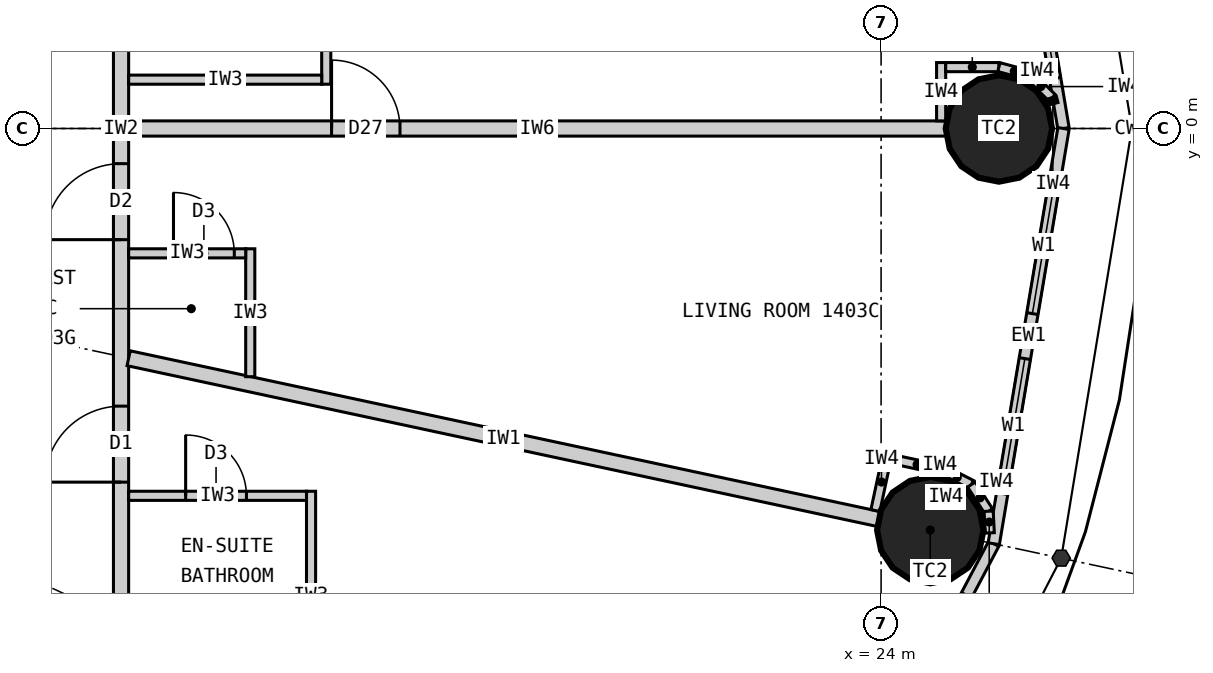
"""IFC4 building model, lengths in metres.
Left out: names, types, materials, properties, quantities, classifications, styles, units other than length and angle.
Written with IfcOpenShell. Run it as: python <this file> out.ifc"""

import sys

from ifc_helpers import new_model, si_unit, direction, frame, frame_2d, origin, origin_2d, place, context, subcontext, project, spatial, rectangle, circle, extrude, element, fill, save


model = new_model("IFC4")
c1 = context("Model", 3, precision=1e-05, world=origin(), true_north=direction((0.0, 1.0)))
c2 = subcontext(c1, "Body", "Model", "MODEL_VIEW")
j1 = project(units=[si_unit("LENGTHUNIT", "METRE"), si_unit("PLANEANGLEUNIT", "RADIAN")], contexts=[c1])
p1 = place(None, origin())
s1 = spatial("IfcSite", under=j1, at=p1, CompositionType="ELEMENT")
p2 = place(p1, origin())
s2 = spatial("IfcBuilding", under=s1, at=p2, CompositionType="ELEMENT")
p3 = place(p2, frame((0.0, 0.0, 60.6)))
s3 = spatial("IfcBuildingStorey", under=s2, at=p3, CompositionType="ELEMENT", Elevation=60.6)
for number, where, z_axis, x_axis in (
    (1, (25.55, 0.0, 0.0), (0.0, 0.0, 1.0), (1.0, 0.0, 0.0)),
    (2, (24.647, -5.283, 0.0), (0.0, 0.0, 1.0), (1.0, 0.0, 0.0)),
):
    element("IfcColumn", number, at=place(p3, frame(where, z_axis=z_axis, x_axis=x_axis)), inside=s3, PredefinedType="COLUMN", context=c2, shape_type="SweptSolid", body=[
        extrude(circle(Radius=0.7, at=origin_2d()), origin(), (0.0, 0.0, 1.0), 3.3),
    ])
p4 = place(p3, frame((26.4, 0.0, 0.0), z_axis=(0.0, 0.0, 1.0), x_axis=(-0.165642551694, 0.986185857264, 0.0)))
e3 = element("IfcWall", 3, at=p4, inside=s3, PredefinedType="ELEMENTEDWALL", context=c2, shape_type="SweptSolid", body=[
    extrude(rectangle(XDim=5.539, YDim=0.15, at=frame_2d((2.77, 0.0))), origin(), (0.0, 0.0, 1.0), 3.12),
])
p5 = place(p4, frame((0.669, 0.0, 0.9)))
e4 = element("IfcOpeningElement", 4, at=p5, cuts=e3, PredefinedType="OPENING", context=c2, shape_type="SweptSolid", body=[
    extrude(rectangle(XDim=1.8, YDim=1.9, at=frame_2d((0.9, 0.95))), frame((0.0, 0.085, 0.0), z_axis=(0.0, -1.0, 0.0), x_axis=(1.0, 0.0, 0.0)), (0.0, 0.0, 1.0), 0.17),
])
p6 = place(p4, frame((3.07, 0.0, 0.9)))
e5 = element("IfcOpeningElement", 5, at=p6, cuts=e3, PredefinedType="OPENING", context=c2, shape_type="SweptSolid", body=[
    extrude(rectangle(XDim=1.8, YDim=1.9, at=frame_2d((0.9, 0.95))), frame((0.0, 0.085, 0.0), z_axis=(0.0, -1.0, 0.0), x_axis=(1.0, 0.0, 0.0)), (0.0, 0.0, 1.0), 0.17),
])
p7 = place(p3, frame((22.803, -10.532, 0.0), z_axis=(0.0, 0.0, 1.0), x_axis=(0.467296867008, 0.884100468321, 0.0)))
e6 = element("IfcWall", 6, at=p7, inside=s3, PredefinedType="ELEMENTEDWALL", context=c2, shape_type="SweptSolid", body=[
    extrude(rectangle(XDim=5.734, YDim=0.15, at=frame_2d((2.867, 0.0))), origin(), (0.0, 0.0, 1.0), 3.12),
])
p8 = place(p7, frame((0.767, 0.0, 0.9)))
e7 = element("IfcOpeningElement", 7, at=p8, cuts=e6, PredefinedType="OPENING", context=c2, shape_type="SweptSolid", body=[
    extrude(rectangle(XDim=1.8, YDim=1.9, at=frame_2d((0.9, 0.95))), frame((0.0, 0.085, 0.0), z_axis=(0.0, -1.0, 0.0), x_axis=(1.0, 0.0, 0.0)), (0.0, 0.0, 1.0), 0.17),
])
p9 = place(p7, frame((3.167, 0.0, 0.9)))
e8 = element("IfcOpeningElement", 8, at=p9, cuts=e6, PredefinedType="OPENING", context=c2, shape_type="SweptSolid", body=[
    extrude(rectangle(XDim=1.8, YDim=1.9, at=frame_2d((0.9, 0.95))), frame((0.0, 0.085, 0.0), z_axis=(0.0, -1.0, 0.0), x_axis=(1.0, 0.0, 0.0)), (0.0, 0.0, 1.0), 0.17),
])
p10 = place(p3, frame((25.482, -5.462, 0.0), z_axis=(0.0, 0.0, 1.0), x_axis=(0.165642551694, 0.986185857264, 0.0)))
e9 = element("IfcWall", 9, at=p10, inside=s3, PredefinedType="ELEMENTEDWALL", context=c2, shape_type="SweptSolid", body=[
    extrude(rectangle(XDim=5.539, YDim=0.15, at=frame_2d((2.77, 0.0))), origin(), (0.0, 0.0, 1.0), 3.12),
])
p11 = place(p10, frame((0.669, 0.0, 0.9)))
e10 = element("IfcOpeningElement", 10, at=p11, cuts=e9, PredefinedType="OPENING", context=c2, shape_type="SweptSolid", body=[
    extrude(rectangle(XDim=1.8, YDim=1.9, at=frame_2d((0.9, 0.95))), frame((0.0, 0.085, 0.0), z_axis=(0.0, -1.0, 0.0), x_axis=(1.0, 0.0, 0.0)), (0.0, 0.0, 1.0), 0.17),
])
p12 = place(p10, frame((3.07, 0.0, 0.9)))
e11 = element("IfcOpeningElement", 11, at=p12, cuts=e9, PredefinedType="OPENING", context=c2, shape_type="SweptSolid", body=[
    extrude(rectangle(XDim=1.8, YDim=1.9, at=frame_2d((0.9, 0.95))), frame((0.0, 0.085, 0.0), z_axis=(0.0, -1.0, 0.0), x_axis=(1.0, 0.0, 0.0)), (0.0, 0.0, 1.0), 0.17),
])
p13 = place(p3, frame((14.0, -9.9, 0.0), z_axis=(0.0, 0.0, 1.0), x_axis=(0.0, 1.0, 0.0)))
e12 = element("IfcWall", 12, at=p13, inside=s3, PredefinedType="PARTITIONING", context=c2, shape_type="SweptSolid", body=[
    extrude(rectangle(XDim=19.8, YDim=0.2, at=frame_2d((9.9, 0.0))), origin(), (0.0, 0.0, 1.0), 3.12),
])
p14 = place(p13, frame((0.103, 0.0, 0.0)))
e13 = element("IfcOpeningElement", 13, at=p14, cuts=e12, PredefinedType="OPENING", context=c2, shape_type="SweptSolid", body=[
    extrude(rectangle(XDim=1.0, YDim=2.2, at=frame_2d((0.5, 1.1))), frame((0.0, 0.11, 0.0), z_axis=(0.0, -1.0, 0.0), x_axis=(1.0, 0.0, 0.0)), (0.0, 0.0, 1.0), 0.22),
])
p15 = place(p13, frame((5.248, 0.0, 0.0)))
e14 = element("IfcOpeningElement", 14, at=p15, cuts=e12, PredefinedType="OPENING", context=c2, shape_type="SweptSolid", body=[
    extrude(rectangle(XDim=1.0, YDim=2.2, at=frame_2d((0.5, 1.1))), frame((0.0, 0.11, 0.0), z_axis=(0.0, -1.0, 0.0), x_axis=(1.0, 0.0, 0.0)), (0.0, 0.0, 1.0), 0.22),
])
p16 = place(p13, frame((8.438, 0.0, 0.0)))
e15 = element("IfcOpeningElement", 15, at=p16, cuts=e12, PredefinedType="OPENING", context=c2, shape_type="SweptSolid", body=[
    extrude(rectangle(XDim=1.0, YDim=2.2, at=frame_2d((0.5, 1.1))), frame((0.0, 0.11, 0.0), z_axis=(0.0, -1.0, 0.0), x_axis=(1.0, 0.0, 0.0)), (0.0, 0.0, 1.0), 0.22),
])
p17 = place(p13, frame((14.532, 0.0, 0.0)))
e16 = element("IfcOpeningElement", 16, at=p17, cuts=e12, PredefinedType="OPENING", context=c2, shape_type="SweptSolid", body=[
    extrude(rectangle(XDim=1.0, YDim=2.2, at=frame_2d((0.5, 1.1))), frame((0.0, 0.11, 0.0), z_axis=(0.0, -1.0, 0.0), x_axis=(1.0, 0.0, 0.0)), (0.0, 0.0, 1.0), 0.22),
])
p18 = place(p3, frame((14.1, 0.0, 0.0), z_axis=(0.0, 0.0, 1.0), x_axis=(1.0, 0.0, 0.0)))
e17 = element("IfcWall", 17, at=p18, inside=s3, PredefinedType="PARTITIONING", context=c2, shape_type="SweptSolid", body=[
    extrude(rectangle(XDim=10.75, YDim=0.2, at=frame_2d((5.375, 0.0))), origin(), (0.0, 0.0, 1.0), 2.27),
])
p19 = place(p18, frame((2.67, 0.0, 0.0)))
e18 = element("IfcOpeningElement", 18, at=p19, cuts=e17, PredefinedType="OPENING", context=c2, shape_type="SweptSolid", body=[
    extrude(rectangle(XDim=0.9, YDim=2.1, at=frame_2d((0.45, 1.05))), frame((0.0, 0.11, 0.0), z_axis=(0.0, -1.0, 0.0), x_axis=(1.0, 0.0, 0.0)), (0.0, 0.0, 1.0), 0.22),
])
p20 = place(p3, frame((14.1, -3.022, 0.0), z_axis=(0.0, 0.0, 1.0), x_axis=(0.977790014929, -0.209586943072, 0.0)))
e19 = element("IfcWall", 19, at=p20, inside=s3, PredefinedType="PARTITIONING", context=c2, shape_type="SweptSolid", body=[
    extrude(rectangle(XDim=10.087, YDim=0.2, at=frame_2d((5.043, 0.0))), origin(), (0.0, 0.0, 1.0), 2.32),
])
p21 = place(p3, frame((16.5, -7.521, 0.0), z_axis=(0.0, 0.0, 1.0), x_axis=(0.0, 1.0, 0.0)))
e20 = element("IfcWall", 20, at=p21, inside=s3, PredefinedType="PARTITIONING", context=c2, shape_type="SweptSolid", body=[
    extrude(rectangle(XDim=2.749, YDim=0.12, at=frame_2d((1.374, 0.0))), origin(), (0.0, 0.0, 1.0), 3.12),
])
p22 = place(p3, frame((14.1, -4.833, 0.0), z_axis=(0.0, 0.0, 1.0), x_axis=(1.0, 0.0, 0.0)))
e21 = element("IfcWall", 21, at=p22, inside=s3, PredefinedType="PARTITIONING", context=c2, shape_type="SweptSolid", body=[
    extrude(rectangle(XDim=2.34, YDim=0.12, at=frame_2d((1.17, 0.0))), origin(), (0.0, 0.0, 1.0), 3.12),
])
p23 = place(p22, frame((0.75, 0.0, 0.0)))
e22 = element("IfcOpeningElement", 22, at=p23, cuts=e21, PredefinedType="OPENING", context=c2, shape_type="SweptSolid", body=[
    extrude(rectangle(XDim=0.8, YDim=2.1, at=frame_2d((0.4, 1.05))), frame((0.0, 0.07, 0.0), z_axis=(0.0, -1.0, 0.0), x_axis=(1.0, 0.0, 0.0)), (0.0, 0.0, 1.0), 0.14),
])
p24 = place(p3, frame((15.7, -3.265, 0.0), z_axis=(0.0, 0.0, 1.0), x_axis=(0.0, 1.0, 0.0)))
e23 = element("IfcWall", 23, at=p24, inside=s3, PredefinedType="PARTITIONING", context=c2, shape_type="SweptSolid", body=[
    extrude(rectangle(XDim=1.683, YDim=0.12, at=frame_2d((0.841, 0.0))), origin(), (0.0, 0.0, 1.0), 3.12),
])
p25 = place(p3, frame((14.1, -1.643, 0.0), z_axis=(0.0, 0.0, 1.0), x_axis=(1.0, 0.0, 0.0)))
e24 = element("IfcWall", 24, at=p25, inside=s3, PredefinedType="PARTITIONING", context=c2, shape_type="SweptSolid", body=[
    extrude(rectangle(XDim=1.54, YDim=0.12, at=frame_2d((0.77, 0.0))), origin(), (0.0, 0.0, 1.0), 2.32),
])
p26 = place(p25, frame((0.59, 0.0, 0.0)))
e25 = element("IfcOpeningElement", 25, at=p26, cuts=e24, PredefinedType="OPENING", context=c2, shape_type="SweptSolid", body=[
    extrude(rectangle(XDim=0.8, YDim=2.1, at=frame_2d((0.4, 1.05))), frame((0.0, 0.07, 0.0), z_axis=(0.0, -1.0, 0.0), x_axis=(1.0, 0.0, 0.0)), (0.0, 0.0, 1.0), 0.14),
])
p27 = place(p3, frame((16.7, 3.48, 0.0), z_axis=(0.0, 0.0, 1.0), x_axis=(0.0, -1.0, 0.0)))
e26 = element("IfcWall", 26, at=p27, inside=s3, PredefinedType="PARTITIONING", context=c2, shape_type="SweptSolid", body=[
    extrude(rectangle(XDim=2.897, YDim=0.12, at=frame_2d((1.449, 0.0))), origin(), (0.0, 0.0, 1.0), 3.12),
])
p28 = place(p27, frame((1.049, 0.0, 0.0)))
e27 = element("IfcOpeningElement", 27, at=p28, cuts=e26, PredefinedType="OPENING", context=c2, shape_type="SweptSolid", body=[
    extrude(rectangle(XDim=0.8, YDim=2.1, at=frame_2d((0.4, 1.05))), frame((0.0, 0.07, 0.0), z_axis=(0.0, -1.0, 0.0), x_axis=(1.0, 0.0, 0.0)), (0.0, 0.0, 1.0), 0.14),
])
p29 = place(p3, frame((14.1, 0.643, 0.0), z_axis=(0.0, 0.0, 1.0), x_axis=(1.0, 0.0, 0.0)))
e28 = element("IfcWall", 28, at=p29, inside=s3, PredefinedType="PARTITIONING", context=c2, shape_type="SweptSolid", body=[
    extrude(rectangle(XDim=2.54, YDim=0.12, at=frame_2d((1.27, 0.0))), origin(), (0.0, 0.0, 1.0), 3.12),
])
p30 = place(p3, frame((24.79, 0.1, 0.0), z_axis=(0.0, 0.0, 1.0), x_axis=(0.0, 1.0, 0.0)))
e29 = element("IfcWall", 29, at=p30, inside=s3, PredefinedType="PARTITIONING", context=c2, shape_type="SweptSolid", body=[
    extrude(rectangle(XDim=0.767, YDim=0.12, at=frame_2d((0.384, 0.0))), origin(), (0.0, 0.0, 1.0), 3.12),
])
p31 = place(p3, frame((24.85, 0.808, 0.0), z_axis=(0.0, 0.0, 1.0), x_axis=(1.0, 0.0, 0.0)))
e30 = element("IfcWall", 30, at=p31, inside=s3, PredefinedType="PARTITIONING", context=c2, shape_type="SweptSolid", body=[
    extrude(rectangle(XDim=0.7, YDim=0.12, at=frame_2d((0.35, 0.0))), origin(), (0.0, 0.0, 1.0), 3.12),
])
p32 = place(p3, frame((25.55, 0.808, 0.0), z_axis=(0.0, 0.0, 1.0), x_axis=(0.965807183573, -0.2592614205, 0.0)))
e31 = element("IfcWall", 31, at=p32, inside=s3, PredefinedType="PARTITIONING", context=c2, shape_type="SweptSolid", body=[
    extrude(rectangle(XDim=0.418, YDim=0.12, at=frame_2d((0.209, 0.0))), origin(), (0.0, 0.0, 1.0), 3.12),
])
p33 = place(p3, frame((25.954, 0.699, 0.0), z_axis=(0.0, 0.0, 1.0), x_axis=(0.707106781187, -0.707106781187, 0.0)))
e32 = element("IfcWall", 32, at=p33, inside=s3, PredefinedType="PARTITIONING", context=c2, shape_type="SweptSolid", body=[
    extrude(rectangle(XDim=0.418, YDim=0.12, at=frame_2d((0.209, 0.0))), origin(), (0.0, 0.0, 1.0), 3.12),
])
p34 = place(p3, frame((26.249, 0.404, 0.0), z_axis=(0.0, 0.0, 1.0), x_axis=(0.259754282609, -0.965674744759, 0.0)))
e33 = element("IfcWall", 33, at=p34, inside=s3, PredefinedType="PARTITIONING", context=c2, shape_type="SweptSolid", body=[
    extrude(rectangle(XDim=0.08, YDim=0.12, at=frame_2d((0.04, 0.0))), origin(), (0.0, 0.0, 1.0), 3.12),
])
p35 = place(p3, frame((23.925, -5.026, 0.0), z_axis=(0.0, 0.0, 1.0), x_axis=(0.209681192172, 0.977769808109, 0.0)))
e34 = element("IfcWall", 34, at=p35, inside=s3, PredefinedType="PARTITIONING", context=c2, shape_type="SweptSolid", body=[
    extrude(rectangle(XDim=0.767, YDim=0.12, at=frame_2d((0.384, 0.0))), origin(), (0.0, 0.0, 1.0), 3.12),
])
p36 = place(p3, frame((24.132, -4.347, 0.0), z_axis=(0.0, 0.0, 1.0), x_axis=(0.977776882509, -0.209648200638, 0.0)))
e35 = element("IfcWall", 35, at=p36, inside=s3, PredefinedType="PARTITIONING", context=c2, shape_type="SweptSolid", body=[
    extrude(rectangle(XDim=0.7, YDim=0.12, at=frame_2d((0.35, 0.0))), origin(), (0.0, 0.0, 1.0), 3.12),
])
for number, where, z_axis, x_axis in (
    (36, (24.816, -4.494, 0.0), (0.0, 0.0, 1.0), (0.89, -0.455, 0.0)),
    (37, (25.188, -4.684, 0.0), (0.0, 0.0, 1.0), (0.543, -0.84, 0.0)),
):
    element("IfcWall", number, at=place(p3, frame(where, z_axis=z_axis, x_axis=x_axis)), inside=s3, PredefinedType="PARTITIONING", context=c2, shape_type="SweptSolid", body=[
        extrude(rectangle(XDim=0.418, YDim=0.12, at=frame_2d((0.209, 0.0))), origin(), (0.0, 0.0, 1.0), 3.12),
    ])
p37 = place(p3, frame((25.416, -5.035, 0.0), z_axis=(0.0, 0.0, 1.0), x_axis=(0.050406329159, -0.998728793007, 0.0)))
e38 = element("IfcWall", 38, at=p37, inside=s3, PredefinedType="PARTITIONING", context=c2, shape_type="SweptSolid", body=[
    extrude(rectangle(XDim=0.286, YDim=0.12, at=frame_2d((0.143, 0.0))), origin(), (0.0, 0.0, 1.0), 3.12),
])
p38 = place(p5, origin())
e39 = element("IfcWindow", 39, at=p38, inside=s3, PartitioningType="SINGLE_PANEL", PredefinedType="WINDOW", context=c2, shape_type="SweptSolid", body=[
    extrude(rectangle(XDim=1.8, YDim=1.9, at=frame_2d((0.9, 0.95))), frame((0.0, 0.03, 0.0), z_axis=(0.0, -1.0, 0.0), x_axis=(1.0, 0.0, 0.0)), (0.0, 0.0, 1.0), 0.06),
])
fill(e4, e39)
p39 = place(p11, origin())
e40 = element("IfcWindow", 40, at=p39, inside=s3, PartitioningType="SINGLE_PANEL", PredefinedType="WINDOW", context=c2, shape_type="SweptSolid", body=[
    extrude(rectangle(XDim=1.8, YDim=1.9, at=frame_2d((0.9, 0.95))), frame((0.0, 0.03, 0.0), z_axis=(0.0, -1.0, 0.0), x_axis=(1.0, 0.0, 0.0)), (0.0, 0.0, 1.0), 0.06),
])
fill(e10, e40)
p40 = place(p12, origin())
e41 = element("IfcWindow", 41, at=p40, inside=s3, PartitioningType="SINGLE_PANEL", PredefinedType="WINDOW", context=c2, shape_type="SweptSolid", body=[
    extrude(rectangle(XDim=1.8, YDim=1.9, at=frame_2d((0.9, 0.95))), frame((0.0, 0.03, 0.0), z_axis=(0.0, -1.0, 0.0), x_axis=(1.0, 0.0, 0.0)), (0.0, 0.0, 1.0), 0.06),
])
fill(e11, e41)
p41 = place(p23, origin())
e42 = element("IfcDoor", 42, at=p41, inside=s3, OperationType="SINGLE_SWING_LEFT", PredefinedType="DOOR", context=c2, shape_type="SweptSolid", body=[
    extrude(rectangle(XDim=0.8, YDim=2.1, at=frame_2d((0.4, 1.05))), frame((0.0, 0.025, 0.0), z_axis=(0.0, -1.0, 0.0), x_axis=(1.0, 0.0, 0.0)), (0.0, 0.0, 1.0), 0.05),
])
fill(e22, e42)
p42 = place(p15, origin())
e43 = element("IfcDoor", 43, at=p42, inside=s3, OperationType="SINGLE_SWING_LEFT", PredefinedType="DOOR", context=c2, shape_type="SweptSolid", body=[
    extrude(rectangle(XDim=1.0, YDim=2.2, at=frame_2d((0.5, 1.1))), frame((0.0, 0.025, 0.0), z_axis=(0.0, -1.0, 0.0), x_axis=(1.0, 0.0, 0.0)), (0.0, 0.0, 1.0), 0.05),
])
fill(e14, e43)
p43 = place(p26, origin())
e44 = element("IfcDoor", 44, at=p43, inside=s3, OperationType="SINGLE_SWING_LEFT", PredefinedType="DOOR", context=c2, shape_type="SweptSolid", body=[
    extrude(rectangle(XDim=0.8, YDim=2.1, at=frame_2d((0.4, 1.05))), frame((0.0, 0.025, 0.0), z_axis=(0.0, -1.0, 0.0), x_axis=(1.0, 0.0, 0.0)), (0.0, 0.0, 1.0), 0.05),
])
fill(e25, e44)
p44 = place(p16, origin())
e45 = element("IfcDoor", 45, at=p44, inside=s3, OperationType="SINGLE_SWING_LEFT", PredefinedType="DOOR", context=c2, shape_type="SweptSolid", body=[
    extrude(rectangle(XDim=1.0, YDim=2.2, at=frame_2d((0.5, 1.1))), frame((0.0, 0.025, 0.0), z_axis=(0.0, -1.0, 0.0), x_axis=(1.0, 0.0, 0.0)), (0.0, 0.0, 1.0), 0.05),
])
fill(e15, e45)
p45 = place(p19, origin())
e46 = element("IfcDoor", 46, at=p45, inside=s3, OperationType="SINGLE_SWING_LEFT", PredefinedType="DOOR", context=c2, shape_type="SweptSolid", body=[
    extrude(rectangle(XDim=0.9, YDim=2.1, at=frame_2d((0.45, 1.05))), frame((0.0, 0.025, 0.0), z_axis=(0.0, -1.0, 0.0), x_axis=(1.0, 0.0, 0.0)), (0.0, 0.0, 1.0), 0.05),
])
fill(e18, e46)
save(model, sys.argv[1])
